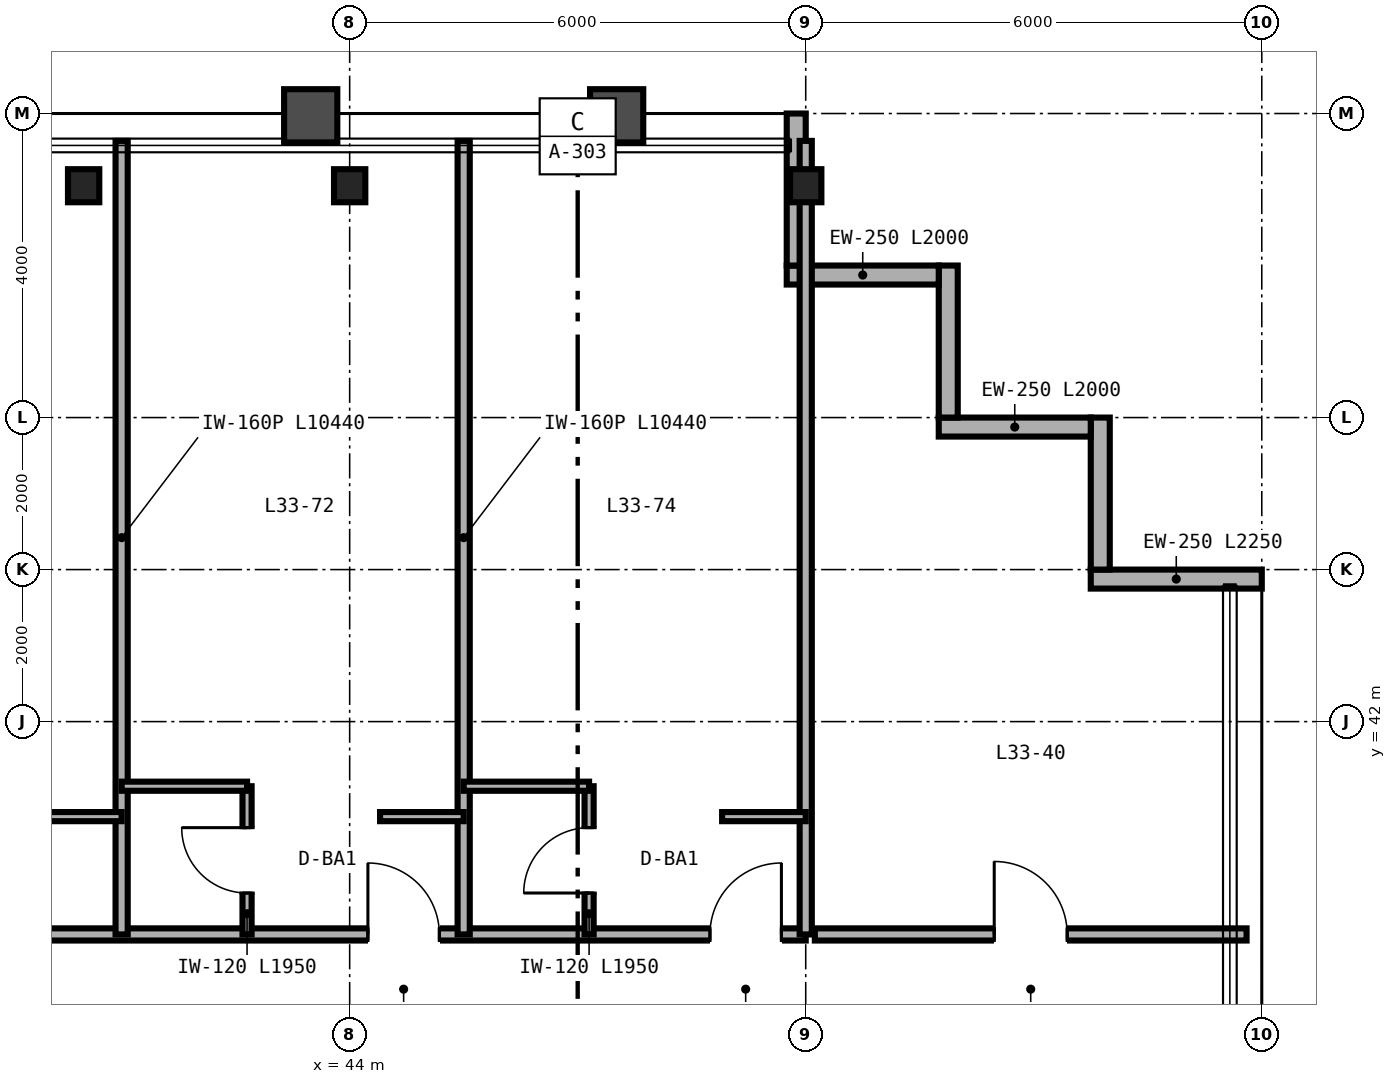
"""IFC4 building model, lengths in metres.
Left out: names, types, materials, properties, quantities, classifications, styles, units other than length and angle.
Written with IfcOpenShell. Run it as: python <this file> out.ifc"""

import sys

from ifc_helpers import new_model, si_unit, direction, frame, frame_2d, origin, origin_2d, place, context, subcontext, project, spatial, rectangle, i_section, extrude, source, transform, mapped, element, fill, save


model = new_model("IFC4")
c1 = context("Model", 3, precision=1e-05, world=origin(), true_north=direction((0.0, 1.0)))
c2 = subcontext(c1, "Body", "Model", "MODEL_VIEW")
j1 = project(units=[si_unit("LENGTHUNIT", "METRE"), si_unit("PLANEANGLEUNIT", "RADIAN")], contexts=[c1])
p1 = place(None, origin())
s1 = spatial("IfcSite", under=j1, at=p1, CompositionType="ELEMENT")
p2 = place(p1, origin())
s2 = spatial("IfcBuilding", under=s1, at=p2, CompositionType="ELEMENT")
p3 = place(p2, frame((0.0, 0.0, 133.2)))
s3 = spatial("IfcBuildingStorey", under=s2, at=p3, CompositionType="ELEMENT", Elevation=133.2)
m1 = source(origin(), c2, "Body", "SweptSolid", [
    extrude(i_section(OverallWidth=0.412, OverallDepth=0.435, WebThickness=0.036, FlangeThickness=0.057, FilletRadius=0.025, at=origin_2d()), origin(), (0.0, 0.0, 1.0), 3.36),
])
for number, where, z_axis, x_axis in (
    (1, (40.5, 49.05, 0.0), (0.0, 0.0, 1.0), (1.0, 0.0, 0.0)),
    (2, (44.0, 49.05, 0.0), (0.0, 0.0, 1.0), (1.0, 0.0, 0.0)),
    (3, (50.0, 49.05, 0.0), (0.0, 0.0, 1.0), (1.0, 0.0, 0.0)),
):
    element("IfcColumn", number, at=place(p3, frame(where, z_axis=z_axis, x_axis=x_axis)), inside=s3, PredefinedType="COLUMN", context=c2, shape_type="MappedRepresentation", body=[
        mapped(m1, transform((0.0, 0.0, 0.0), scale=1.0)),
    ])
p4 = place(p3, frame((56.0, 43.875, 0.0), z_axis=(0.0, 0.0, 1.0), x_axis=(-1.0, 0.0, 0.0)))
e4 = element("IfcWall", 4, at=p4, inside=s3, PredefinedType="SOLIDWALL", context=c2, shape_type="SweptSolid", body=[
    extrude(rectangle(XDim=2.25, YDim=0.25, at=frame_2d((1.125, 0.0))), origin(), (0.0, 0.0, 1.0), 3.36),
])
for number, where, z_axis, x_axis in (
    (5, (53.875, 44.0, 0.0), (0.0, 0.0, 1.0), (0.0, 1.0, 0.0)),
    (6, (53.75, 45.875, 0.0), (0.0, 0.0, 1.0), (-1.0, 0.0, 0.0)),
    (7, (51.875, 46.0, 0.0), (0.0, 0.0, 1.0), (0.0, 1.0, 0.0)),
    (8, (51.75, 47.875, 0.0), (0.0, 0.0, 1.0), (-1.0, 0.0, 0.0)),
):
    element("IfcWall", number, at=place(p3, frame(where, z_axis=z_axis, x_axis=x_axis)), inside=s3, PredefinedType="SOLIDWALL", context=c2, shape_type="SweptSolid", body=[
        extrude(rectangle(XDim=2.0, YDim=0.25, at=frame_2d((1.0, 0.0))), origin(), (0.0, 0.0, 1.0), 3.36),
    ])
p5 = place(p3, frame((49.875, 48.0, 0.0), z_axis=(0.0, 0.0, 1.0), x_axis=(0.0, 1.0, 0.0)))
e9 = element("IfcWall", 9, at=p5, inside=s3, PredefinedType="SOLIDWALL", context=c2, shape_type="SweptSolid", body=[
    extrude(rectangle(XDim=2.0, YDim=0.25, at=frame_2d((1.0, 0.0))), origin(), (0.0, 0.0, 1.0), 2.667),
])
p6 = place(p3, frame((50.12, 39.2, 0.0), z_axis=(0.0, 0.0, 1.0), x_axis=(1.0, 0.0, 0.0)))
e10 = element("IfcWall", 10, at=p6, inside=s3, PredefinedType="PARTITIONING", context=c2, shape_type="SweptSolid", body=[
    extrude(rectangle(XDim=5.68, YDim=0.16, at=frame_2d((2.84, 0.0))), origin(), (0.0, 0.0, 1.0), 3.36),
])
p7 = place(p6, frame((2.36, 0.0, 0.0)))
e11 = element("IfcOpeningElement", 11, at=p7, cuts=e10, PredefinedType="OPENING", context=c2, shape_type="SweptSolid", body=[
    extrude(rectangle(XDim=0.96, YDim=2.15, at=frame_2d((0.48, 1.075))), frame((0.0, 0.09, 0.0), z_axis=(0.0, -1.0, 0.0), x_axis=(1.0, 0.0, 0.0)), (0.0, 0.0, 1.0), 0.18),
])
p8 = place(p3, frame((14.0, 39.2, 0.0), z_axis=(0.0, 0.0, 1.0), x_axis=(1.0, 0.0, 0.0)))
e12 = element("IfcWall", 12, at=p8, inside=s3, PredefinedType="PARTITIONING", context=c2, shape_type="SweptSolid", body=[
    extrude(rectangle(XDim=36.0, YDim=0.16, at=frame_2d((18.0, 0.0))), origin(), (0.0, 0.0, 1.0), 2.581),
])
p9 = place(p8, frame((3.14, 0.0, 0.0)))
e13 = element("IfcOpeningElement", 13, at=p9, cuts=e12, PredefinedType="OPENING", context=c2, shape_type="SweptSolid", body=[
    extrude(rectangle(XDim=0.94, YDim=2.15, at=frame_2d((0.47, 1.075))), frame((0.0, 0.09, 0.0), z_axis=(0.0, -1.0, 0.0), x_axis=(1.0, 0.0, 0.0)), (0.0, 0.0, 1.0), 0.18),
])
p10 = place(p8, frame((7.54, 0.0, 0.0)))
e14 = element("IfcOpeningElement", 14, at=p10, cuts=e12, PredefinedType="OPENING", context=c2, shape_type="SweptSolid", body=[
    extrude(rectangle(XDim=0.94, YDim=2.15, at=frame_2d((0.47, 1.075))), frame((0.0, 0.09, 0.0), z_axis=(0.0, -1.0, 0.0), x_axis=(1.0, 0.0, 0.0)), (0.0, 0.0, 1.0), 0.18),
])
p11 = place(p8, frame((11.94, 0.0, 0.0)))
e15 = element("IfcOpeningElement", 15, at=p11, cuts=e12, PredefinedType="OPENING", context=c2, shape_type="SweptSolid", body=[
    extrude(rectangle(XDim=0.94, YDim=2.15, at=frame_2d((0.47, 1.075))), frame((0.0, 0.09, 0.0), z_axis=(0.0, -1.0, 0.0), x_axis=(1.0, 0.0, 0.0)), (0.0, 0.0, 1.0), 0.18),
])
p12 = place(p8, frame((15.02, 0.0, 0.0)))
e16 = element("IfcOpeningElement", 16, at=p12, cuts=e12, PredefinedType="OPENING", context=c2, shape_type="SweptSolid", body=[
    extrude(rectangle(XDim=0.96, YDim=2.15, at=frame_2d((0.48, 1.075))), frame((0.0, 0.09, 0.0), z_axis=(0.0, -1.0, 0.0), x_axis=(1.0, 0.0, 0.0)), (0.0, 0.0, 1.0), 0.18),
])
p13 = place(p8, frame((21.14, 0.0, 0.0)))
e17 = element("IfcOpeningElement", 17, at=p13, cuts=e12, PredefinedType="OPENING", context=c2, shape_type="SweptSolid", body=[
    extrude(rectangle(XDim=0.94, YDim=2.15, at=frame_2d((0.47, 1.075))), frame((0.0, 0.09, 0.0), z_axis=(0.0, -1.0, 0.0), x_axis=(1.0, 0.0, 0.0)), (0.0, 0.0, 1.0), 0.18),
])
p14 = place(p8, frame((24.79, 0.0, 0.0)))
e18 = element("IfcOpeningElement", 18, at=p14, cuts=e12, PredefinedType="OPENING", context=c2, shape_type="SweptSolid", body=[
    extrude(rectangle(XDim=0.94, YDim=2.15, at=frame_2d((0.47, 1.075))), frame((0.0, 0.09, 0.0), z_axis=(0.0, -1.0, 0.0), x_axis=(1.0, 0.0, 0.0)), (0.0, 0.0, 1.0), 0.18),
])
p15 = place(p8, frame((30.24, 0.0, 0.0)))
e19 = element("IfcOpeningElement", 19, at=p15, cuts=e12, PredefinedType="OPENING", context=c2, shape_type="SweptSolid", body=[
    extrude(rectangle(XDim=0.94, YDim=2.15, at=frame_2d((0.47, 1.075))), frame((0.0, 0.09, 0.0), z_axis=(0.0, -1.0, 0.0), x_axis=(1.0, 0.0, 0.0)), (0.0, 0.0, 1.0), 0.18),
])
p16 = place(p8, frame((34.74, 0.0, 0.0)))
e20 = element("IfcOpeningElement", 20, at=p16, cuts=e12, PredefinedType="OPENING", context=c2, shape_type="SweptSolid", body=[
    extrude(rectangle(XDim=0.94, YDim=2.15, at=frame_2d((0.47, 1.075))), frame((0.0, 0.09, 0.0), z_axis=(0.0, -1.0, 0.0), x_axis=(1.0, 0.0, 0.0)), (0.0, 0.0, 1.0), 0.18),
])
p17 = place(p3, frame((50.0, 39.2, 0.0), z_axis=(0.0, 0.0, 1.0), x_axis=(0.0, 1.0, 0.0)))
e21 = element("IfcWall", 21, at=p17, inside=s3, PredefinedType="PARTITIONING", context=c2, shape_type="SweptSolid", body=[
    extrude(rectangle(XDim=10.44, YDim=0.16, at=frame_2d((5.22, 0.0))), origin(), (0.0, 0.0, 1.0), 2.667),
])
p18 = place(p3, frame((41.0, 39.2, 0.0), z_axis=(0.0, 0.0, 1.0), x_axis=(0.0, 1.0, 0.0)))
e22 = element("IfcWall", 22, at=p18, inside=s3, PredefinedType="PARTITIONING", context=c2, shape_type="SweptSolid", body=[
    extrude(rectangle(XDim=10.44, YDim=0.16, at=frame_2d((5.22, 0.0))), origin(), (0.0, 0.0, 1.0), 2.823),
])
p19 = place(p3, frame((39.9, 40.75, 0.0), z_axis=(0.0, 0.0, 1.0), x_axis=(1.0, 0.0, 0.0)))
e23 = element("IfcWall", 23, at=p19, inside=s3, PredefinedType="PARTITIONING", context=c2, shape_type="SweptSolid", body=[
    extrude(rectangle(XDim=1.1, YDim=0.12, at=frame_2d((0.55, 0.0))), origin(), (0.0, 0.0, 1.0), 2.581),
])
p20 = place(p3, frame((45.5, 39.2, 0.0), z_axis=(0.0, 0.0, 1.0), x_axis=(0.0, 1.0, 0.0)))
e24 = element("IfcWall", 24, at=p20, inside=s3, PredefinedType="PARTITIONING", context=c2, shape_type="SweptSolid", body=[
    extrude(rectangle(XDim=10.44, YDim=0.16, at=frame_2d((5.22, 0.0))), origin(), (0.0, 0.0, 1.0), 2.667),
])
p21 = place(p3, frame((42.65, 39.2, 0.0), z_axis=(0.0, 0.0, 1.0), x_axis=(0.0, 1.0, 0.0)))
e25 = element("IfcWall", 25, at=p21, inside=s3, PredefinedType="PARTITIONING", context=c2, shape_type="SweptSolid", body=[
    extrude(rectangle(XDim=1.95, YDim=0.12, at=frame_2d((0.975, 0.0))), origin(), (0.0, 0.0, 1.0), 3.36),
])
p22 = place(p21, frame((0.545, 0.0, 0.0)))
e26 = element("IfcOpeningElement", 26, at=p22, cuts=e25, PredefinedType="OPENING", context=c2, shape_type="SweptSolid", body=[
    extrude(rectangle(XDim=0.86, YDim=2.1, at=frame_2d((0.43, 1.05))), frame((0.0, 0.07, 0.0), z_axis=(0.0, -1.0, 0.0), x_axis=(1.0, 0.0, 0.0)), (0.0, 0.0, 1.0), 0.14),
])
p23 = place(p3, frame((41.0, 41.15, 0.0), z_axis=(0.0, 0.0, 1.0), x_axis=(1.0, 0.0, 0.0)))
e27 = element("IfcWall", 27, at=p23, inside=s3, PredefinedType="PARTITIONING", context=c2, shape_type="SweptSolid", body=[
    extrude(rectangle(XDim=1.65, YDim=0.12, at=frame_2d((0.825, 0.0))), origin(), (0.0, 0.0, 1.0), 3.36),
])
p24 = place(p3, frame((44.4, 40.75, 0.0), z_axis=(0.0, 0.0, 1.0), x_axis=(1.0, 0.0, 0.0)))
e28 = element("IfcWall", 28, at=p24, inside=s3, PredefinedType="PARTITIONING", context=c2, shape_type="SweptSolid", body=[
    extrude(rectangle(XDim=1.1, YDim=0.12, at=frame_2d((0.55, 0.0))), origin(), (0.0, 0.0, 1.0), 3.36),
])
p25 = place(p3, frame((47.15, 39.2, 0.0), z_axis=(0.0, 0.0, 1.0), x_axis=(0.0, 1.0, 0.0)))
e29 = element("IfcWall", 29, at=p25, inside=s3, PredefinedType="PARTITIONING", context=c2, shape_type="SweptSolid", body=[
    extrude(rectangle(XDim=1.95, YDim=0.12, at=frame_2d((0.975, 0.0))), origin(), (0.0, 0.0, 1.0), 3.36),
])
p26 = place(p25, frame((0.545, 0.0, 0.0)))
e30 = element("IfcOpeningElement", 30, at=p26, cuts=e29, PredefinedType="OPENING", context=c2, shape_type="SweptSolid", body=[
    extrude(rectangle(XDim=0.86, YDim=2.1, at=frame_2d((0.43, 1.05))), frame((0.0, 0.07, 0.0), z_axis=(0.0, -1.0, 0.0), x_axis=(1.0, 0.0, 0.0)), (0.0, 0.0, 1.0), 0.14),
])
p27 = place(p3, frame((45.5, 41.15, 0.0), z_axis=(0.0, 0.0, 1.0), x_axis=(1.0, 0.0, 0.0)))
e31 = element("IfcWall", 31, at=p27, inside=s3, PredefinedType="PARTITIONING", context=c2, shape_type="SweptSolid", body=[
    extrude(rectangle(XDim=1.65, YDim=0.12, at=frame_2d((0.825, 0.0))), origin(), (0.0, 0.0, 1.0), 3.36),
])
p28 = place(p3, frame((48.9, 40.75, 0.0), z_axis=(0.0, 0.0, 1.0), x_axis=(1.0, 0.0, 0.0)))
e32 = element("IfcWall", 32, at=p28, inside=s3, PredefinedType="PARTITIONING", context=c2, shape_type="SweptSolid", body=[
    extrude(rectangle(XDim=1.1, YDim=0.12, at=frame_2d((0.55, 0.0))), origin(), (0.0, 0.0, 1.0), 3.36),
])
m2 = source(origin(), c2, "Body", "SweptSolid", [
    extrude(rectangle(XDim=0.96, YDim=2.15, at=frame_2d((0.48, 1.075))), frame((0.0, 0.025, 0.0), z_axis=(0.0, -1.0, 0.0), x_axis=(1.0, 0.0, 0.0)), (0.0, 0.0, 1.0), 0.05),
])
p29 = place(p7, origin())
e33 = element("IfcDoor", 33, at=p29, inside=s3, OperationType="SINGLE_SWING_LEFT", PredefinedType="DOOR", context=c2, shape_type="MappedRepresentation", body=[
    mapped(m2, transform((0.0, 0.0, 0.0), scale=1.0)),
])
fill(e11, e33)
m3 = source(origin(), c2, "Body", "SweptSolid", [
    extrude(rectangle(XDim=0.86, YDim=2.1, at=frame_2d((0.43, 1.05))), frame((0.0, 0.025, 0.0), z_axis=(0.0, -1.0, 0.0), x_axis=(1.0, 0.0, 0.0)), (0.0, 0.0, 1.0), 0.05),
])
p30 = place(p22, origin())
e34 = element("IfcDoor", 34, at=p30, inside=s3, OperationType="SINGLE_SWING_RIGHT", PredefinedType="DOOR", context=c2, shape_type="MappedRepresentation", body=[
    mapped(m3, transform((0.0, 0.0, 0.0), scale=1.0)),
])
fill(e26, e34)
p31 = place(p26, origin())
e35 = element("IfcDoor", 35, at=p31, inside=s3, OperationType="SINGLE_SWING_LEFT", PredefinedType="DOOR", context=c2, shape_type="MappedRepresentation", body=[
    mapped(m3, transform((0.0, 0.0, 0.0), scale=1.0)),
])
fill(e30, e35)
m4 = source(origin(), c2, "Body", "SweptSolid", [
    extrude(rectangle(XDim=0.94, YDim=2.15, at=frame_2d((0.47, 1.075))), frame((0.0, 0.025, 0.0), z_axis=(0.0, -1.0, 0.0), x_axis=(1.0, 0.0, 0.0)), (0.0, 0.0, 1.0), 0.05),
])
p32 = place(p15, origin())
e36 = element("IfcDoor", 36, at=p32, inside=s3, OperationType="SINGLE_SWING_LEFT", PredefinedType="DOOR", context=c2, shape_type="MappedRepresentation", body=[
    mapped(m4, transform((0.0, 0.0, 0.0), scale=1.0)),
])
fill(e19, e36)
p33 = place(p16, origin())
e37 = element("IfcDoor", 37, at=p33, inside=s3, OperationType="SINGLE_SWING_RIGHT", PredefinedType="DOOR", context=c2, shape_type="MappedRepresentation", body=[
    mapped(m4, transform((0.0, 0.0, 0.0), scale=1.0)),
])
fill(e20, e37)
save(model, sys.argv[1])
